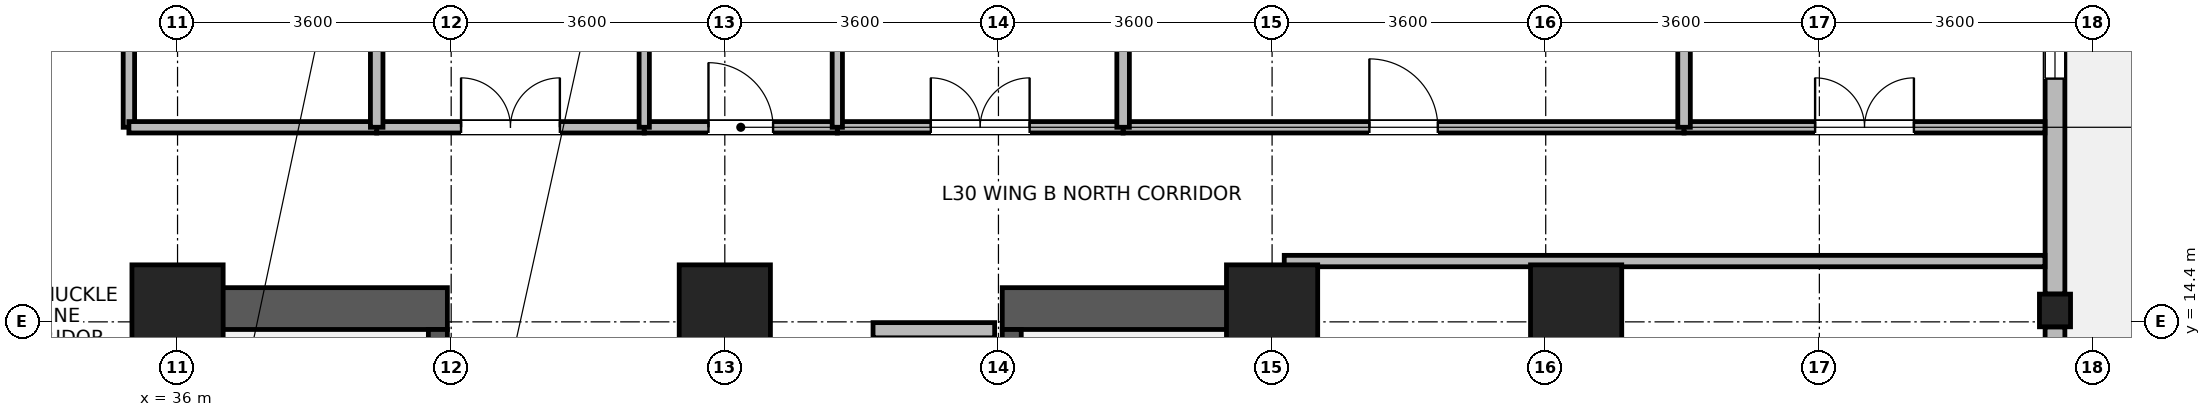
"""IFC4 building model, lengths in metres.
Left out: names, types, materials, properties, quantities, classifications, styles, units other than length and angle.
Written with IfcOpenShell. Run it as: python <this file> out.ifc"""

import sys

from ifc_helpers import new_model, si_unit, direction, frame, frame_2d, origin, origin_2d, place, context, subcontext, project, spatial, rectangle, i_section, extrude, source, transform, mapped, element, fill, save


model = new_model("IFC4")
c1 = context("Model", 3, precision=1e-05, world=origin(), true_north=direction((0.0, 1.0)))
c2 = subcontext(c1, "Body", "Model", "MODEL_VIEW")
j1 = project(units=[si_unit("LENGTHUNIT", "METRE"), si_unit("PLANEANGLEUNIT", "RADIAN")], contexts=[c1])
p1 = place(None, origin())
s1 = spatial("IfcSite", under=j1, at=p1, CompositionType="ELEMENT")
p2 = place(p1, origin())
s2 = spatial("IfcBuilding", under=s1, at=p2, CompositionType="ELEMENT")
p3 = place(p2, frame((0.0, 0.0, 119.3)))
s3 = spatial("IfcBuildingStorey", under=s2, at=p3, CompositionType="ELEMENT", Elevation=119.3)
for number, where, z_axis, x_axis in (
    (1, (36.075, 6.75, 0.0), (0.0, 0.0, 1.0), (0.0, 1.0, 0.0)),
    (2, (50.325, 6.75, 0.0), (0.0, 0.0, 1.0), (0.0, 1.0, 0.0)),
):
    element("IfcWall", number, at=place(p3, frame(where, z_axis=z_axis, x_axis=x_axis)), inside=s3, PredefinedType="SHEAR", context=c2, shape_type="SweptSolid", body=[
        extrude(rectangle(XDim=8.1, YDim=0.55, at=frame_2d((4.05, 0.0))), origin(), (0.0, 0.0, 1.0), 3.45),
    ])
for number, where, z_axis, x_axis in (
    (3, (36.35, 14.575, 0.0), (0.0, 0.0, 1.0), (1.0, 0.0, 0.0)),
    (4, (46.85, 14.575, 0.0), (0.0, 0.0, 1.0), (1.0, 0.0, 0.0)),
):
    element("IfcWall", number, at=place(p3, frame(where, z_axis=z_axis, x_axis=x_axis)), inside=s3, PredefinedType="SHEAR", context=c2, shape_type="SweptSolid", body=[
        extrude(rectangle(XDim=3.2, YDim=0.55, at=frame_2d((1.6, 0.0))), origin(), (0.0, 0.0, 1.0), 3.45),
    ])
p4 = place(p3, frame((39.425, 7.3, 0.0), z_axis=(0.0, 0.0, 1.0), x_axis=(0.0, 1.0, 0.0)))
e5 = element("IfcWall", 5, at=p4, inside=s3, PredefinedType="SHEAR", context=c2, shape_type="SweptSolid", body=[
    extrude(rectangle(XDim=7.0, YDim=0.25, at=frame_2d((3.5, 0.0))), origin(), (0.0, 0.0, 1.0), 3.45),
])
p5 = place(p4, frame((0.15, 0.0, 0.0)))
e6 = element("IfcOpeningElement", 6, at=p5, cuts=e5, PredefinedType="OPENING", context=c2, shape_type="SweptSolid", body=[
    extrude(rectangle(XDim=1.1, YDim=2.08, at=frame_2d((0.55, 1.04))), frame((0.0, 0.135, 0.0), z_axis=(0.0, -1.0, 0.0), x_axis=(1.0, 0.0, 0.0)), (0.0, 0.0, 1.0), 0.27),
])
p6 = place(p3, frame((46.975, 7.3, 0.0), z_axis=(0.0, 0.0, 1.0), x_axis=(0.0, 1.0, 0.0)))
e7 = element("IfcWall", 7, at=p6, inside=s3, PredefinedType="SHEAR", context=c2, shape_type="SweptSolid", body=[
    extrude(rectangle(XDim=7.0, YDim=0.25, at=frame_2d((3.5, 0.0))), origin(), (0.0, 0.0, 1.0), 3.45),
])
p7 = place(p6, frame((0.15, 0.0, 0.0)))
e8 = element("IfcOpeningElement", 8, at=p7, cuts=e7, PredefinedType="OPENING", context=c2, shape_type="SweptSolid", body=[
    extrude(rectangle(XDim=1.1, YDim=2.08, at=frame_2d((0.55, 1.04))), frame((0.0, 0.135, 0.0), z_axis=(0.0, -1.0, 0.0), x_axis=(1.0, 0.0, 0.0)), (0.0, 0.0, 1.0), 0.27),
])
m1 = source(origin(), c2, "Body", "SweptSolid", [
    extrude(rectangle(XDim=1.2, YDim=1.2, at=origin_2d()), origin(), (0.0, 0.0, 1.0), 3.7),
])
for number, where, z_axis, x_axis in (
    (9, (36.0, 14.55, 0.0), (0.0, 0.0, 1.0), (1.0, 0.0, 0.0)),
    (10, (43.2, 14.55, 0.0), (0.0, 0.0, 1.0), (1.0, 0.0, 0.0)),
    (11, (50.4, 14.55, 0.0), (0.0, 0.0, 1.0), (1.0, 0.0, 0.0)),
    (12, (54.4, 14.55, 0.0), (0.0, 0.0, 1.0), (1.0, 0.0, 0.0)),
):
    element("IfcColumn", number, at=place(p3, frame(where, z_axis=z_axis, x_axis=x_axis)), inside=s3, PredefinedType="COLUMN", context=c2, shape_type="MappedRepresentation", body=[
        mapped(m1, transform((0.0, 0.0, 0.0), x_axis=(1.0, 0.0, 0.0), y_axis=(0.0, 1.0, 0.0), z_axis=(0.0, 0.0, 1.0), scale=1.0)),
    ])
m2 = source(origin(), c2, "Body", "SweptSolid", [
    extrude(i_section(OverallWidth=0.409, OverallDepth=0.43, WebThickness=0.024, FlangeThickness=0.033, FilletRadius=0.015, at=origin_2d()), origin(), (0.0, 0.0, 1.0), 3.7),
])
p8 = place(p3, frame((60.7, 14.55, 0.0), z_axis=(0.0, 0.0, 1.0), x_axis=(1.0, 0.0, 0.0)))
e13 = element("IfcColumn", 13, at=p8, inside=s3, PredefinedType="COLUMN", context=c2, shape_type="MappedRepresentation", body=[
    mapped(m2, transform((0.0, 0.0, 0.0), x_axis=(1.0, 0.0, 0.0), y_axis=(0.0, 1.0, 0.0), z_axis=(0.0, 0.0, 1.0), scale=1.0)),
])
p9 = place(p3, frame((60.7, 14.334, 0.0), z_axis=(0.0, 0.0, 1.0), x_axis=(0.0, -1.0, 0.0)))
e14 = element("IfcWall", 14, at=p9, inside=s3, PredefinedType="STANDARD", context=c2, shape_type="SweptSolid", body=[
    extrude(rectangle(XDim=7.068, YDim=0.26, at=frame_2d((3.534, 0.0))), origin(), (0.0, 0.0, 1.0), 2.98),
])
p10 = place(p9, frame((2.784, 0.0, 0.0)))
e15 = element("IfcOpeningElement", 15, at=p10, cuts=e14, PredefinedType="OPENING", context=c2, shape_type="SweptSolid", body=[
    extrude(rectangle(XDim=1.5, YDim=2.15, at=frame_2d((0.75, 1.075))), frame((0.0, 0.14, 0.0), z_axis=(0.0, -1.0, 0.0), x_axis=(1.0, 0.0, 0.0)), (0.0, 0.0, 1.0), 0.28),
])
p11 = place(p9, frame((1.017, 0.0, 0.85)))
e16 = element("IfcOpeningElement", 16, at=p11, cuts=e14, PredefinedType="OPENING", context=c2, shape_type="SweptSolid", body=[
    extrude(rectangle(XDim=1.5, YDim=1.85, at=frame_2d((0.75, 0.925))), frame((0.0, 0.14, 0.0), z_axis=(0.0, -1.0, 0.0), x_axis=(1.0, 0.0, 0.0)), (0.0, 0.0, 1.0), 0.28),
])
p12 = place(p9, frame((4.551, 0.0, 0.85)))
e17 = element("IfcOpeningElement", 17, at=p12, cuts=e14, PredefinedType="OPENING", context=c2, shape_type="SweptSolid", body=[
    extrude(rectangle(XDim=1.5, YDim=1.85, at=frame_2d((0.75, 0.925))), frame((0.0, 0.14, 0.0), z_axis=(0.0, -1.0, 0.0), x_axis=(1.0, 0.0, 0.0)), (0.0, 0.0, 1.0), 0.28),
])
p13 = place(p3, frame((60.7, 21.384, 0.0), z_axis=(0.0, 0.0, 1.0), x_axis=(0.0, -1.0, 0.0)))
e18 = element("IfcWall", 18, at=p13, inside=s3, PredefinedType="STANDARD", context=c2, shape_type="SweptSolid", body=[
    extrude(rectangle(XDim=6.618, YDim=0.26, at=frame_2d((3.309, 0.0))), origin(), (0.0, 0.0, 1.0), 2.98),
])
p14 = place(p13, frame((0.905, 0.0, 0.85)))
e19 = element("IfcOpeningElement", 19, at=p14, cuts=e18, PredefinedType="OPENING", context=c2, shape_type="SweptSolid", body=[
    extrude(rectangle(XDim=1.5, YDim=1.85, at=frame_2d((0.75, 0.925))), frame((0.0, 0.14, 0.0), z_axis=(0.0, -1.0, 0.0), x_axis=(1.0, 0.0, 0.0)), (0.0, 0.0, 1.0), 0.28),
])
p15 = place(p13, frame((2.834, 0.0, 0.85)))
e20 = element("IfcOpeningElement", 20, at=p15, cuts=e18, PredefinedType="OPENING", context=c2, shape_type="SweptSolid", body=[
    extrude(rectangle(XDim=0.95, YDim=1.75, at=frame_2d((0.475, 0.875))), frame((0.0, 0.14, 0.0), z_axis=(0.0, -1.0, 0.0), x_axis=(1.0, 0.0, 0.0)), (0.0, 0.0, 1.0), 0.28),
])
p16 = place(p3, frame((45.15, 14.29, 0.0), z_axis=(0.0, 0.0, 1.0), x_axis=(1.0, 0.0, 0.0)))
e21 = element("IfcWall", 21, at=p16, inside=s3, PredefinedType="PARTITIONING", context=c2, shape_type="SweptSolid", body=[
    extrude(rectangle(XDim=1.6, YDim=0.2, at=frame_2d((0.8, 0.0))), origin(), (0.0, 0.0, 1.0), 2.43),
])
p17 = place(p3, frame((50.56, 15.2, 0.0), z_axis=(0.0, 0.0, 1.0), x_axis=(1.0, 0.0, 0.0)))
e22 = element("IfcWall", 22, at=p17, inside=s3, PredefinedType="PARTITIONING", context=c2, shape_type="SweptSolid", body=[
    extrude(rectangle(XDim=10.008, YDim=0.15, at=frame_2d((5.004, 0.0))), origin(), (0.0, 0.0, 1.0), 3.43),
])
p18 = place(p3, frame((35.36, 16.96, 0.0), z_axis=(0.0, 0.0, 1.0), x_axis=(0.0, 1.0, 0.0)))
e23 = element("IfcWall", 23, at=p18, inside=s3, PredefinedType="PARTITIONING", context=c2, shape_type="SweptSolid", body=[
    extrude(rectangle(XDim=9.64, YDim=0.15, at=frame_2d((4.82, 0.0))), origin(), (0.0, 0.0, 1.0), 3.43),
])
p19 = place(p18, frame((2.435, 0.0, 0.0)))
e24 = element("IfcOpeningElement", 24, at=p19, cuts=e23, PredefinedType="OPENING", context=c2, shape_type="SweptSolid", body=[
    extrude(rectangle(XDim=1.3, YDim=2.12, at=frame_2d((0.65, 1.06))), frame((0.0, 0.085, 0.0), z_axis=(0.0, -1.0, 0.0), x_axis=(1.0, 0.0, 0.0)), (0.0, 0.0, 1.0), 0.17),
])
p20 = place(p3, frame((48.44, 16.96, 0.0), z_axis=(0.0, 0.0, 1.0), x_axis=(1.0, 0.0, 0.0)))
e25 = element("IfcWall", 25, at=p20, inside=s3, PredefinedType="PARTITIONING", context=c2, shape_type="SweptSolid", body=[
    extrude(rectangle(XDim=7.38, YDim=0.15, at=frame_2d((3.69, 0.0))), origin(), (0.0, 0.0, 1.0), 3.43),
])
p21 = place(p20, frame((3.24, 0.0, 0.0)))
e26 = element("IfcOpeningElement", 26, at=p21, cuts=e25, PredefinedType="OPENING", context=c2, shape_type="SweptSolid", body=[
    extrude(rectangle(XDim=0.9, YDim=2.08, at=frame_2d((0.45, 1.04))), frame((0.0, 0.085, 0.0), z_axis=(0.0, -1.0, 0.0), x_axis=(1.0, 0.0, 0.0)), (0.0, 0.0, 1.0), 0.17),
])
p22 = place(p3, frame((55.82, 16.96, 0.0), z_axis=(0.0, 0.0, 1.0), x_axis=(1.0, 0.0, 0.0)))
e27 = element("IfcWall", 27, at=p22, inside=s3, PredefinedType="PARTITIONING", context=c2, shape_type="SweptSolid", body=[
    extrude(rectangle(XDim=4.748, YDim=0.15, at=frame_2d((2.374, 0.0))), origin(), (0.0, 0.0, 1.0), 3.43),
])
p23 = place(p22, frame((1.724, 0.0, 0.0)))
e28 = element("IfcOpeningElement", 28, at=p23, cuts=e27, PredefinedType="OPENING", context=c2, shape_type="SweptSolid", body=[
    extrude(rectangle(XDim=1.3, YDim=2.12, at=frame_2d((0.65, 1.06))), frame((0.0, 0.085, 0.0), z_axis=(0.0, -1.0, 0.0), x_axis=(1.0, 0.0, 0.0)), (0.0, 0.0, 1.0), 0.17),
])
p24 = place(p3, frame((44.68, 16.96, 0.0), z_axis=(0.0, 0.0, 1.0), x_axis=(1.0, 0.0, 0.0)))
e29 = element("IfcWall", 29, at=p24, inside=s3, PredefinedType="PARTITIONING", context=c2, shape_type="SweptSolid", body=[
    extrude(rectangle(XDim=3.76, YDim=0.15, at=frame_2d((1.88, 0.0))), origin(), (0.0, 0.0, 1.0), 3.43),
])
p25 = place(p24, frame((1.23, 0.0, 0.0)))
e30 = element("IfcOpeningElement", 30, at=p25, cuts=e29, PredefinedType="OPENING", context=c2, shape_type="SweptSolid", body=[
    extrude(rectangle(XDim=1.3, YDim=2.12, at=frame_2d((0.65, 1.06))), frame((0.0, 0.085, 0.0), z_axis=(0.0, -1.0, 0.0), x_axis=(1.0, 0.0, 0.0)), (0.0, 0.0, 1.0), 0.17),
])
p26 = place(p3, frame((38.62, 16.96, 0.0), z_axis=(0.0, 0.0, 1.0), x_axis=(1.0, 0.0, 0.0)))
e31 = element("IfcWall", 31, at=p26, inside=s3, PredefinedType="PARTITIONING", context=c2, shape_type="SweptSolid", body=[
    extrude(rectangle(XDim=3.52, YDim=0.15, at=frame_2d((1.76, 0.0))), origin(), (0.0, 0.0, 1.0), 3.43),
])
p27 = place(p26, frame((1.11, 0.0, 0.0)))
e32 = element("IfcOpeningElement", 32, at=p27, cuts=e31, PredefinedType="OPENING", context=c2, shape_type="SweptSolid", body=[
    extrude(rectangle(XDim=1.3, YDim=2.12, at=frame_2d((0.65, 1.06))), frame((0.0, 0.085, 0.0), z_axis=(0.0, -1.0, 0.0), x_axis=(1.0, 0.0, 0.0)), (0.0, 0.0, 1.0), 0.17),
])
p28 = place(p3, frame((35.36, 16.96, 0.0), z_axis=(0.0, 0.0, 1.0), x_axis=(1.0, 0.0, 0.0)))
e33 = element("IfcWall", 33, at=p28, inside=s3, PredefinedType="PARTITIONING", context=c2, shape_type="SweptSolid", body=[
    extrude(rectangle(XDim=3.26, YDim=0.15, at=frame_2d((1.63, 0.0))), origin(), (0.0, 0.0, 1.0), 3.43),
])
p29 = place(p3, frame((42.14, 16.96, 0.0), z_axis=(0.0, 0.0, 1.0), x_axis=(1.0, 0.0, 0.0)))
e34 = element("IfcWall", 34, at=p29, inside=s3, PredefinedType="PARTITIONING", context=c2, shape_type="SweptSolid", body=[
    extrude(rectangle(XDim=2.54, YDim=0.15, at=frame_2d((1.27, 0.0))), origin(), (0.0, 0.0, 1.0), 3.43),
])
p30 = place(p29, frame((0.845, 0.0, 0.0)))
e35 = element("IfcOpeningElement", 35, at=p30, cuts=e34, PredefinedType="OPENING", context=c2, shape_type="SweptSolid", body=[
    extrude(rectangle(XDim=0.85, YDim=2.04, at=frame_2d((0.425, 1.02))), frame((0.0, 0.085, 0.0), z_axis=(0.0, -1.0, 0.0), x_axis=(1.0, 0.0, 0.0)), (0.0, 0.0, 1.0), 0.17),
])
p31 = place(p3, frame((38.62, 16.96, 0.0), z_axis=(0.0, 0.0, 1.0), x_axis=(0.0, 1.0, 0.0)))
e36 = element("IfcWall", 36, at=p31, inside=s3, PredefinedType="PARTITIONING", context=c2, shape_type="SweptSolid", body=[
    extrude(rectangle(XDim=9.64, YDim=0.165, at=frame_2d((4.82, 0.0))), origin(), (0.0, 0.0, 1.0), 3.43),
])
for number, where, z_axis, x_axis in (
    (37, (42.14, 16.96, 0.0), (0.0, 0.0, 1.0), (0.0, 1.0, 0.0)),
    (38, (44.68, 16.96, 0.0), (0.0, 0.0, 1.0), (0.0, 1.0, 0.0)),
):
    element("IfcWall", number, at=place(p3, frame(where, z_axis=z_axis, x_axis=x_axis)), inside=s3, PredefinedType="PARTITIONING", context=c2, shape_type="SweptSolid", body=[
        extrude(rectangle(XDim=9.64, YDim=0.135, at=frame_2d((4.82, 0.0))), origin(), (0.0, 0.0, 1.0), 3.43),
    ])
for number, where, z_axis, x_axis in (
    (39, (48.44, 16.96, 0.0), (0.0, 0.0, 1.0), (0.0, 1.0, 0.0)),
    (40, (55.82, 16.96, 0.0), (0.0, 0.0, 1.0), (0.0, 1.0, 0.0)),
):
    element("IfcWall", number, at=place(p3, frame(where, z_axis=z_axis, x_axis=x_axis)), inside=s3, PredefinedType="PARTITIONING", context=c2, shape_type="SweptSolid", body=[
        extrude(rectangle(XDim=9.64, YDim=0.165, at=frame_2d((4.82, 0.0))), origin(), (0.0, 0.0, 1.0), 3.43),
    ])
p32 = place(p15, origin())
e41 = element("IfcWindow", 41, at=p32, inside=s3, PartitioningType="SINGLE_PANEL", PredefinedType="WINDOW", context=c2, shape_type="SweptSolid", body=[
    extrude(rectangle(XDim=0.95, YDim=1.75, at=frame_2d((0.475, 0.875))), frame((0.0, 0.03, 0.0), z_axis=(0.0, -1.0, 0.0), x_axis=(1.0, 0.0, 0.0)), (0.0, 0.0, 1.0), 0.06),
])
fill(e20, e41)
p33 = place(p21, origin())
e42 = element("IfcDoor", 42, at=p33, inside=s3, OperationType="SINGLE_SWING_LEFT", PredefinedType="DOOR", context=c2, shape_type="SweptSolid", body=[
    extrude(rectangle(XDim=0.9, YDim=2.08, at=frame_2d((0.45, 1.04))), frame((0.0, 0.025, 0.0), z_axis=(0.0, -1.0, 0.0), x_axis=(1.0, 0.0, 0.0)), (0.0, 0.0, 1.0), 0.05),
])
fill(e26, e42)
p34 = place(p23, origin())
e43 = element("IfcDoor", 43, at=p34, inside=s3, OperationType="DOUBLE_DOOR_SINGLE_SWING", PredefinedType="DOOR", context=c2, shape_type="SweptSolid", body=[
    extrude(rectangle(XDim=1.3, YDim=2.12, at=frame_2d((0.65, 1.06))), frame((0.0, 0.025, 0.0), z_axis=(0.0, -1.0, 0.0), x_axis=(1.0, 0.0, 0.0)), (0.0, 0.0, 1.0), 0.05),
])
fill(e28, e43)
p35 = place(p25, origin())
e44 = element("IfcDoor", 44, at=p35, inside=s3, OperationType="DOUBLE_DOOR_SINGLE_SWING", PredefinedType="DOOR", context=c2, shape_type="SweptSolid", body=[
    extrude(rectangle(XDim=1.3, YDim=2.12, at=frame_2d((0.65, 1.06))), frame((0.0, 0.025, 0.0), z_axis=(0.0, -1.0, 0.0), x_axis=(1.0, 0.0, 0.0)), (0.0, 0.0, 1.0), 0.05),
])
fill(e30, e44)
p36 = place(p27, origin())
e45 = element("IfcDoor", 45, at=p36, inside=s3, OperationType="DOUBLE_DOOR_SINGLE_SWING", PredefinedType="DOOR", context=c2, shape_type="SweptSolid", body=[
    extrude(rectangle(XDim=1.3, YDim=2.12, at=frame_2d((0.65, 1.06))), frame((0.0, 0.025, 0.0), z_axis=(0.0, -1.0, 0.0), x_axis=(1.0, 0.0, 0.0)), (0.0, 0.0, 1.0), 0.05),
])
fill(e32, e45)
p37 = place(p30, origin())
e46 = element("IfcDoor", 46, at=p37, inside=s3, OperationType="SINGLE_SWING_LEFT", PredefinedType="DOOR", context=c2, shape_type="SweptSolid", body=[
    extrude(rectangle(XDim=0.85, YDim=2.04, at=frame_2d((0.425, 1.02))), frame((0.0, 0.025, 0.0), z_axis=(0.0, -1.0, 0.0), x_axis=(1.0, 0.0, 0.0)), (0.0, 0.0, 1.0), 0.05),
])
fill(e35, e46)
save(model, sys.argv[1])
